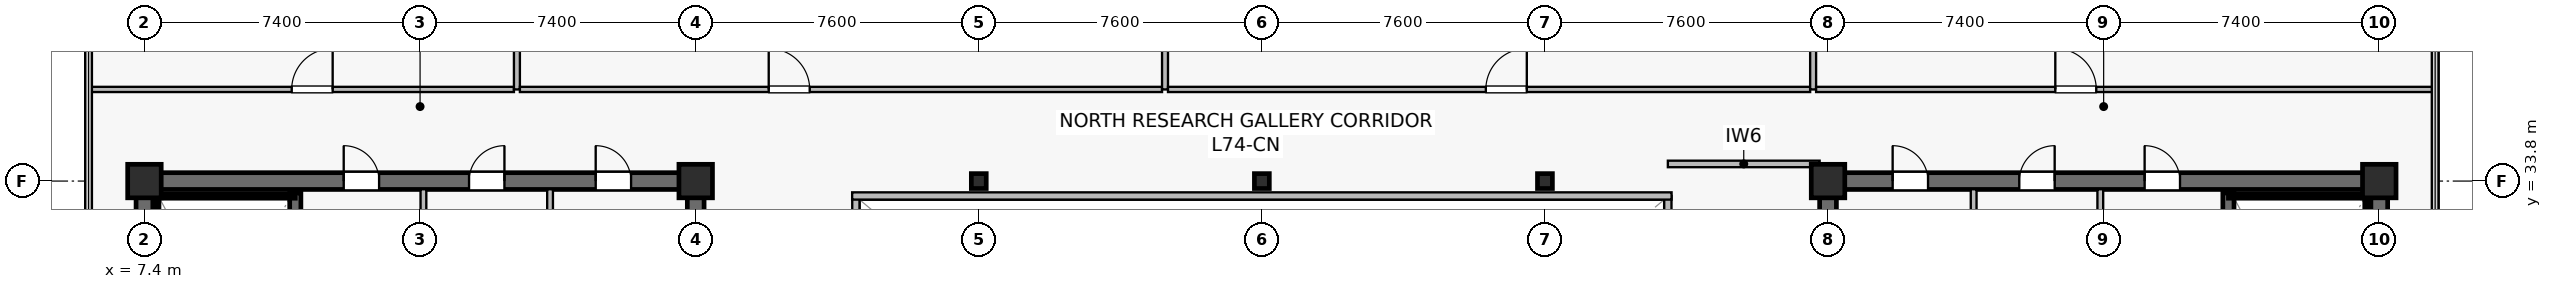
"""IFC4 building model, lengths in metres.
Left out: names, types, materials, properties, quantities, classifications, styles, units other than length and angle.
Written with IfcOpenShell. Run it as: python <this file> out.ifc"""

import sys

from ifc_helpers import new_model, si_unit, direction, frame, frame_2d, origin, origin_2d, place, context, subcontext, project, spatial, rectangle, i_section, extrude, source, transform, mapped, element, fill, save


model = new_model("IFC4")
c1 = context("Model", 3, precision=1e-05, world=origin(), true_north=direction((0.0, 1.0)))
c2 = subcontext(c1, "Body", "Model", "MODEL_VIEW")
j1 = project(units=[si_unit("LENGTHUNIT", "METRE"), si_unit("PLANEANGLEUNIT", "RADIAN")], contexts=[c1])
p1 = place(None, origin())
s1 = spatial("IfcSite", under=j1, at=p1, CompositionType="ELEMENT")
p2 = place(p1, origin())
s2 = spatial("IfcBuilding", under=s1, at=p2, CompositionType="ELEMENT")
p3 = place(p2, frame((0.0, 0.0, 310.2)))
s3 = spatial("IfcBuildingStorey", under=s2, at=p3, CompositionType="ELEMENT", Elevation=310.2)
p4 = place(p3, frame((7.175, 33.8, 0.0), z_axis=(0.0, 0.0, 1.0), x_axis=(1.0, 0.0, 0.0)))
e1 = element("IfcWall", 1, at=p4, inside=s3, PredefinedType="SHEAR", context=c2, shape_type="SweptSolid", body=[
    extrude(rectangle(XDim=15.25, YDim=0.45, at=frame_2d((7.625, 0.0))), origin(), (0.0, 0.0, 1.0), 3.9),
])
p5 = place(p4, frame((5.575, 0.0, 0.0)))
e2 = element("IfcOpeningElement", 2, at=p5, cuts=e1, PredefinedType="OPENING", context=c2, shape_type="SweptSolid", body=[
    extrude(rectangle(XDim=0.95, YDim=2.15, at=frame_2d((0.475, 1.075))), frame((0.0, 0.235, 0.0), z_axis=(0.0, -1.0, 0.0), x_axis=(1.0, 0.0, 0.0)), (0.0, 0.0, 1.0), 0.47),
])
p6 = place(p4, frame((8.94, 0.0, 0.0)))
e3 = element("IfcOpeningElement", 3, at=p6, cuts=e1, PredefinedType="OPENING", context=c2, shape_type="SweptSolid", body=[
    extrude(rectangle(XDim=0.95, YDim=2.15, at=frame_2d((0.475, 1.075))), frame((0.0, 0.235, 0.0), z_axis=(0.0, -1.0, 0.0), x_axis=(1.0, 0.0, 0.0)), (0.0, 0.0, 1.0), 0.47),
])
p7 = place(p4, frame((12.34, 0.0, 0.0)))
e4 = element("IfcOpeningElement", 4, at=p7, cuts=e1, PredefinedType="OPENING", context=c2, shape_type="SweptSolid", body=[
    extrude(rectangle(XDim=0.95, YDim=2.15, at=frame_2d((0.475, 1.075))), frame((0.0, 0.235, 0.0), z_axis=(0.0, -1.0, 0.0), x_axis=(1.0, 0.0, 0.0)), (0.0, 0.0, 1.0), 0.47),
])
p8 = place(p3, frame((7.4, 15.025, 0.0), z_axis=(0.0, 0.0, 1.0), x_axis=(0.0, 1.0, 0.0)))
e5 = element("IfcWall", 5, at=p8, inside=s3, PredefinedType="SHEAR", context=c2, shape_type="SweptSolid", body=[
    extrude(rectangle(XDim=18.55, YDim=0.45, at=frame_2d((9.275, 0.0))), origin(), (0.0, 0.0, 1.0), 3.9),
])
p9 = place(p3, frame((22.2, 15.025, 0.0), z_axis=(0.0, 0.0, 1.0), x_axis=(0.0, 1.0, 0.0)))
e6 = element("IfcWall", 6, at=p9, inside=s3, PredefinedType="SHEAR", context=c2, shape_type="SweptSolid", body=[
    extrude(rectangle(XDim=18.55, YDim=0.45, at=frame_2d((9.275, 0.0))), origin(), (0.0, 0.0, 1.0), 3.9),
])
p10 = place(p9, frame((3.525, 0.0, 0.0)))
e7 = element("IfcOpeningElement", 7, at=p10, cuts=e6, PredefinedType="OPENING", context=c2, shape_type="SweptSolid", body=[
    extrude(rectangle(XDim=1.42, YDim=2.2, at=frame_2d((0.71, 1.1))), frame((0.0, 0.235, 0.0), z_axis=(0.0, -1.0, 0.0), x_axis=(1.0, 0.0, 0.0)), (0.0, 0.0, 1.0), 0.47),
])
p11 = place(p3, frame((11.45, 24.85, 0.0), z_axis=(0.0, 0.0, 1.0), x_axis=(0.0, 1.0, 0.0)))
e8 = element("IfcWall", 8, at=p11, inside=s3, PredefinedType="SHEAR", context=c2, shape_type="SweptSolid", body=[
    extrude(rectangle(XDim=8.63, YDim=0.3, at=frame_2d((4.315, 0.0))), origin(), (0.0, 0.0, 1.0), 3.9),
])
p12 = place(p11, frame((0.42, 0.0, 0.0)))
e9 = element("IfcOpeningElement", 9, at=p12, cuts=e8, PredefinedType="OPENING", context=c2, shape_type="SweptSolid", body=[
    extrude(rectangle(XDim=1.1, YDim=2.15, at=frame_2d((0.55, 1.075))), frame((0.0, 0.16, 0.0), z_axis=(0.0, -1.0, 0.0), x_axis=(1.0, 0.0, 0.0)), (0.0, 0.0, 1.0), 0.32),
])
p13 = place(p3, frame((7.73, 33.4, 0.0), z_axis=(0.0, 0.0, 1.0), x_axis=(1.0, 0.0, 0.0)))
e10 = element("IfcWall", 10, at=p13, inside=s3, PredefinedType="SOLIDWALL", context=c2, shape_type="SweptSolid", body=[
    extrude(rectangle(XDim=3.72, YDim=0.12, at=frame_2d((1.86, 0.0))), origin(), (0.0, 0.0, 1.0), 3.9),
])
p14 = place(p3, frame((7.73, 25.0, 0.0), z_axis=(0.0, 0.0, 1.0), x_axis=(0.0, 1.0, 0.0)))
e11 = element("IfcWall", 11, at=p14, inside=s3, PredefinedType="SOLIDWALL", context=c2, shape_type="SweptSolid", body=[
    extrude(rectangle(XDim=8.32, YDim=0.12, at=frame_2d((4.16, 0.0))), origin(), (0.0, 0.0, 1.0), 3.9),
])
p15 = place(p3, frame((52.375, 33.8, 0.0), z_axis=(0.0, 0.0, 1.0), x_axis=(1.0, 0.0, 0.0)))
e12 = element("IfcWall", 12, at=p15, inside=s3, PredefinedType="SHEAR", context=c2, shape_type="SweptSolid", body=[
    extrude(rectangle(XDim=15.25, YDim=0.45, at=frame_2d((7.625, 0.0))), origin(), (0.0, 0.0, 1.0), 3.9),
])
p16 = place(p15, frame((8.725, 0.0, 0.0)))
e13 = element("IfcOpeningElement", 13, at=p16, cuts=e12, PredefinedType="OPENING", context=c2, shape_type="SweptSolid", body=[
    extrude(rectangle(XDim=0.95, YDim=2.15, at=frame_2d((0.475, 1.075))), frame((0.0, 0.235, 0.0), z_axis=(0.0, -1.0, 0.0), x_axis=(1.0, 0.0, 0.0)), (0.0, 0.0, 1.0), 0.47),
])
p17 = place(p15, frame((5.36, 0.0, 0.0)))
e14 = element("IfcOpeningElement", 14, at=p17, cuts=e12, PredefinedType="OPENING", context=c2, shape_type="SweptSolid", body=[
    extrude(rectangle(XDim=0.95, YDim=2.15, at=frame_2d((0.475, 1.075))), frame((0.0, 0.235, 0.0), z_axis=(0.0, -1.0, 0.0), x_axis=(1.0, 0.0, 0.0)), (0.0, 0.0, 1.0), 0.47),
])
p18 = place(p15, frame((1.96, 0.0, 0.0)))
e15 = element("IfcOpeningElement", 15, at=p18, cuts=e12, PredefinedType="OPENING", context=c2, shape_type="SweptSolid", body=[
    extrude(rectangle(XDim=0.95, YDim=2.15, at=frame_2d((0.475, 1.075))), frame((0.0, 0.235, 0.0), z_axis=(0.0, -1.0, 0.0), x_axis=(1.0, 0.0, 0.0)), (0.0, 0.0, 1.0), 0.47),
])
p19 = place(p3, frame((52.6, 15.025, 0.0), z_axis=(0.0, 0.0, 1.0), x_axis=(0.0, 1.0, 0.0)))
e16 = element("IfcWall", 16, at=p19, inside=s3, PredefinedType="SHEAR", context=c2, shape_type="SweptSolid", body=[
    extrude(rectangle(XDim=18.55, YDim=0.45, at=frame_2d((9.275, 0.0))), origin(), (0.0, 0.0, 1.0), 3.9),
])
p20 = place(p19, frame((3.525, 0.0, 0.0)))
e17 = element("IfcOpeningElement", 17, at=p20, cuts=e16, PredefinedType="OPENING", context=c2, shape_type="SweptSolid", body=[
    extrude(rectangle(XDim=1.42, YDim=2.2, at=frame_2d((0.71, 1.1))), frame((0.0, 0.235, 0.0), z_axis=(0.0, -1.0, 0.0), x_axis=(1.0, 0.0, 0.0)), (0.0, 0.0, 1.0), 0.47),
])
p21 = place(p3, frame((67.4, 15.025, 0.0), z_axis=(0.0, 0.0, 1.0), x_axis=(0.0, 1.0, 0.0)))
e18 = element("IfcWall", 18, at=p21, inside=s3, PredefinedType="SHEAR", context=c2, shape_type="SweptSolid", body=[
    extrude(rectangle(XDim=18.55, YDim=0.45, at=frame_2d((9.275, 0.0))), origin(), (0.0, 0.0, 1.0), 3.9),
])
p22 = place(p3, frame((63.35, 24.85, 0.0), z_axis=(0.0, 0.0, 1.0), x_axis=(0.0, 1.0, 0.0)))
e19 = element("IfcWall", 19, at=p22, inside=s3, PredefinedType="SHEAR", context=c2, shape_type="SweptSolid", body=[
    extrude(rectangle(XDim=8.63, YDim=0.3, at=frame_2d((4.315, 0.0))), origin(), (0.0, 0.0, 1.0), 3.9),
])
p23 = place(p22, frame((0.42, 0.0, 0.0)))
e20 = element("IfcOpeningElement", 20, at=p23, cuts=e19, PredefinedType="OPENING", context=c2, shape_type="SweptSolid", body=[
    extrude(rectangle(XDim=1.1, YDim=2.15, at=frame_2d((0.55, 1.075))), frame((0.0, 0.16, 0.0), z_axis=(0.0, -1.0, 0.0), x_axis=(1.0, 0.0, 0.0)), (0.0, 0.0, 1.0), 0.32),
])
p24 = place(p3, frame((63.35, 33.4, 0.0), z_axis=(0.0, 0.0, 1.0), x_axis=(1.0, 0.0, 0.0)))
e21 = element("IfcWall", 21, at=p24, inside=s3, PredefinedType="SOLIDWALL", context=c2, shape_type="SweptSolid", body=[
    extrude(rectangle(XDim=3.72, YDim=0.12, at=frame_2d((1.86, 0.0))), origin(), (0.0, 0.0, 1.0), 3.9),
])
p25 = place(p3, frame((67.07, 25.0, 0.0), z_axis=(0.0, 0.0, 1.0), x_axis=(0.0, 1.0, 0.0)))
e22 = element("IfcWall", 22, at=p25, inside=s3, PredefinedType="SOLIDWALL", context=c2, shape_type="SweptSolid", body=[
    extrude(rectangle(XDim=8.32, YDim=0.12, at=frame_2d((4.16, 0.0))), origin(), (0.0, 0.0, 1.0), 3.9),
])
m1 = source(origin(), c2, "Body", "SweptSolid", [
    extrude(rectangle(XDim=0.9, YDim=0.9, at=origin_2d()), origin(), (0.0, 0.0, 1.0), 4.2),
])
for number, where, z_axis, x_axis in (
    (23, (7.4, 33.8, 0.0), (0.0, 0.0, 1.0), (1.0, 0.0, 0.0)),
    (24, (22.2, 33.8, 0.0), (0.0, 0.0, 1.0), (1.0, 0.0, 0.0)),
    (25, (52.6, 33.8, 0.0), (0.0, 0.0, 1.0), (1.0, 0.0, 0.0)),
    (26, (67.4, 33.8, 0.0), (0.0, 0.0, 1.0), (1.0, 0.0, 0.0)),
):
    element("IfcColumn", number, at=place(p3, frame(where, z_axis=z_axis, x_axis=x_axis)), inside=s3, PredefinedType="COLUMN", context=c2, shape_type="MappedRepresentation", body=[
        mapped(m1, transform((0.0, 0.0, 0.0), scale=1.0)),
    ])
m2 = source(origin(), c2, "Body", "SweptSolid", [
    extrude(i_section(OverallWidth=0.4, OverallDepth=0.4, WebThickness=0.021, FlangeThickness=0.021, at=origin_2d()), origin(), (0.0, 0.0, 1.0), 4.2),
])
for number, where, z_axis, x_axis in (
    (27, (29.8, 33.8, 0.0), (0.0, 0.0, 1.0), (1.0, 0.0, 0.0)),
    (28, (37.4, 33.8, 0.0), (0.0, 0.0, 1.0), (1.0, 0.0, 0.0)),
    (29, (45.0, 33.8, 0.0), (0.0, 0.0, 1.0), (1.0, 0.0, 0.0)),
):
    element("IfcColumn", number, at=place(p3, frame(where, z_axis=z_axis, x_axis=x_axis)), inside=s3, PredefinedType="COLUMN", context=c2, shape_type="MappedRepresentation", body=[
        mapped(m2, transform((0.0, 0.0, 0.0), scale=1.0)),
    ])
p26 = place(p3, frame((14.89, 29.65, 0.0), z_axis=(0.0, 0.0, 1.0), x_axis=(0.0, 1.0, 0.0)))
e30 = element("IfcWall", 30, at=p26, inside=s3, PredefinedType="PLUMBINGWALL", context=c2, shape_type="SweptSolid", body=[
    extrude(rectangle(XDim=3.93, YDim=0.155, at=frame_2d((1.965, 0.0))), origin(), (0.0, 0.0, 1.0), 3.297),
])
p27 = place(p3, frame((18.29, 29.65, 0.0), z_axis=(0.0, 0.0, 1.0), x_axis=(0.0, 1.0, 0.0)))
e31 = element("IfcWall", 31, at=p27, inside=s3, PredefinedType="PLUMBINGWALL", context=c2, shape_type="SweptSolid", body=[
    extrude(rectangle(XDim=3.93, YDim=0.155, at=frame_2d((1.965, 0.0))), origin(), (0.0, 0.0, 1.0), 3.9),
])
p28 = place(p3, frame((59.91, 29.65, 0.0), z_axis=(0.0, 0.0, 1.0), x_axis=(0.0, 1.0, 0.0)))
e32 = element("IfcWall", 32, at=p28, inside=s3, PredefinedType="PLUMBINGWALL", context=c2, shape_type="SweptSolid", body=[
    extrude(rectangle(XDim=3.93, YDim=0.155, at=frame_2d((1.965, 0.0))), origin(), (0.0, 0.0, 1.0), 3.297),
])
p29 = place(p3, frame((56.51, 29.65, 0.0), z_axis=(0.0, 0.0, 1.0), x_axis=(0.0, 1.0, 0.0)))
e33 = element("IfcWall", 33, at=p29, inside=s3, PredefinedType="PLUMBINGWALL", context=c2, shape_type="SweptSolid", body=[
    extrude(rectangle(XDim=3.93, YDim=0.155, at=frame_2d((1.965, 0.0))), origin(), (0.0, 0.0, 1.0), 3.9),
])
p30 = place(p3, frame((48.3, 34.26, 0.0), z_axis=(0.0, 0.0, 1.0), x_axis=(1.0, 0.0, 0.0)))
e34 = element("IfcWall", 34, at=p30, inside=s3, PredefinedType="PARTITIONING", context=c2, shape_type="SweptSolid", body=[
    extrude(rectangle(XDim=4.075, YDim=0.175, at=frame_2d((2.038, 0.0))), origin(), (0.0, 0.0, 1.0), 3.635),
])
p31 = place(p3, frame((26.5, 15.2, 0.0), z_axis=(0.0, 0.0, 1.0), x_axis=(0.0, 1.0, 0.0)))
e35 = element("IfcWall", 35, at=p31, inside=s3, PredefinedType="SOLIDWALL", context=c2, shape_type="SweptSolid", body=[
    extrude(rectangle(XDim=18.2, YDim=0.195, at=frame_2d((9.1, 0.0))), origin(), (0.0, 0.0, 1.0), 3.9),
])
p32 = place(p31, frame((1.8, 0.0, 0.9)))
e36 = element("IfcOpeningElement", 36, at=p32, cuts=e35, PredefinedType="OPENING", context=c2, shape_type="SweptSolid", body=[
    extrude(rectangle(XDim=1.5, YDim=1.4, at=frame_2d((0.75, 0.7))), frame((0.0, 0.107, 0.0), z_axis=(0.0, -1.0, 0.0), x_axis=(1.0, 0.0, 0.0)), (0.0, 0.0, 1.0), 0.215),
])
p33 = place(p31, frame((13.2, 0.0, 0.9)))
e37 = element("IfcOpeningElement", 37, at=p33, cuts=e35, PredefinedType="OPENING", context=c2, shape_type="SweptSolid", body=[
    extrude(rectangle(XDim=1.5, YDim=1.4, at=frame_2d((0.75, 0.7))), frame((0.0, 0.107, 0.0), z_axis=(0.0, -1.0, 0.0), x_axis=(1.0, 0.0, 0.0)), (0.0, 0.0, 1.0), 0.215),
])
p34 = place(p3, frame((48.3, 15.2, 0.0), z_axis=(0.0, 0.0, 1.0), x_axis=(0.0, 1.0, 0.0)))
e38 = element("IfcWall", 38, at=p34, inside=s3, PredefinedType="SOLIDWALL", context=c2, shape_type="SweptSolid", body=[
    extrude(rectangle(XDim=18.2, YDim=0.195, at=frame_2d((9.1, 0.0))), origin(), (0.0, 0.0, 1.0), 3.9),
])
p35 = place(p34, frame((1.8, 0.0, 0.9)))
e39 = element("IfcOpeningElement", 39, at=p35, cuts=e38, PredefinedType="OPENING", context=c2, shape_type="SweptSolid", body=[
    extrude(rectangle(XDim=1.5, YDim=1.4, at=frame_2d((0.75, 0.7))), frame((0.0, 0.107, 0.0), z_axis=(0.0, -1.0, 0.0), x_axis=(1.0, 0.0, 0.0)), (0.0, 0.0, 1.0), 0.215),
])
p36 = place(p34, frame((13.2, 0.0, 0.9)))
e40 = element("IfcOpeningElement", 40, at=p36, cuts=e38, PredefinedType="OPENING", context=c2, shape_type="SweptSolid", body=[
    extrude(rectangle(XDim=1.5, YDim=1.4, at=frame_2d((0.75, 0.7))), frame((0.0, 0.107, 0.0), z_axis=(0.0, -1.0, 0.0), x_axis=(1.0, 0.0, 0.0)), (0.0, 0.0, 1.0), 0.215),
])
p37 = place(p3, frame((26.4, 33.4, 0.0), z_axis=(0.0, 0.0, 1.0), x_axis=(1.0, 0.0, 0.0)))
e41 = element("IfcWall", 41, at=p37, inside=s3, PredefinedType="SOLIDWALL", context=c2, shape_type="SweptSolid", body=[
    extrude(rectangle(XDim=22.0, YDim=0.195, at=frame_2d((11.0, 0.0))), origin(), (0.0, 0.0, 1.0), 3.9),
])
p38 = place(p3, frame((5.91, 36.26, 0.0), z_axis=(0.0, 0.0, 1.0), x_axis=(1.0, 0.0, 0.0)))
e42 = element("IfcWall", 42, at=p38, inside=s3, PredefinedType="PARTITIONING", context=c2, shape_type="SweptSolid", body=[
    extrude(rectangle(XDim=11.41, YDim=0.14, at=frame_2d((5.705, 0.0))), origin(), (0.0, 0.0, 1.0), 3.297),
])
p39 = place(p38, frame((5.443, 0.0, 0.0)))
e43 = element("IfcOpeningElement", 43, at=p39, cuts=e42, PredefinedType="OPENING", context=c2, shape_type="SweptSolid", body=[
    extrude(rectangle(XDim=1.1, YDim=2.18, at=frame_2d((0.55, 1.09))), frame((0.0, 0.08, 0.0), z_axis=(0.0, -1.0, 0.0), x_axis=(1.0, 0.0, 0.0)), (0.0, 0.0, 1.0), 0.16),
])
p40 = place(p3, frame((17.4, 36.26, 0.0), z_axis=(0.0, 0.0, 1.0), x_axis=(0.0, 1.0, 0.0)))
e44 = element("IfcWall", 44, at=p40, inside=s3, PredefinedType="PARTITIONING", context=c2, shape_type="SweptSolid", body=[
    extrude(rectangle(XDim=8.53, YDim=0.16, at=frame_2d((4.265, 0.0))), origin(), (0.0, 0.0, 1.0), 3.235),
])
p41 = place(p3, frame((17.48, 36.26, 0.0), z_axis=(0.0, 0.0, 1.0), x_axis=(1.0, 0.0, 0.0)))
e45 = element("IfcWall", 45, at=p41, inside=s3, PredefinedType="PARTITIONING", context=c2, shape_type="SweptSolid", body=[
    extrude(rectangle(XDim=17.24, YDim=0.14, at=frame_2d((8.62, 0.0))), origin(), (0.0, 0.0, 1.0), 3.297),
])
p42 = place(p41, frame((6.68, 0.0, 0.0)))
e46 = element("IfcOpeningElement", 46, at=p42, cuts=e45, PredefinedType="OPENING", context=c2, shape_type="SweptSolid", body=[
    extrude(rectangle(XDim=1.1, YDim=2.18, at=frame_2d((0.55, 1.09))), frame((0.0, 0.08, 0.0), z_axis=(0.0, -1.0, 0.0), x_axis=(1.0, 0.0, 0.0)), (0.0, 0.0, 1.0), 0.16),
])
p43 = place(p3, frame((34.8, 36.26, 0.0), z_axis=(0.0, 0.0, 1.0), x_axis=(0.0, 1.0, 0.0)))
e47 = element("IfcWall", 47, at=p43, inside=s3, PredefinedType="PARTITIONING", context=c2, shape_type="SweptSolid", body=[
    extrude(rectangle(XDim=7.53, YDim=0.16, at=frame_2d((3.765, 0.0))), origin(), (0.0, 0.0, 1.0), 2.985),
])
p44 = place(p3, frame((34.88, 36.26, 0.0), z_axis=(0.0, 0.0, 1.0), x_axis=(1.0, 0.0, 0.0)))
e48 = element("IfcWall", 48, at=p44, inside=s3, PredefinedType="PARTITIONING", context=c2, shape_type="SweptSolid", body=[
    extrude(rectangle(XDim=17.24, YDim=0.14, at=frame_2d((8.62, 0.0))), origin(), (0.0, 0.0, 1.0), 3.297),
])
p45 = place(p44, frame((8.533, 0.0, 0.0)))
e49 = element("IfcOpeningElement", 49, at=p45, cuts=e48, PredefinedType="OPENING", context=c2, shape_type="SweptSolid", body=[
    extrude(rectangle(XDim=1.1, YDim=2.18, at=frame_2d((0.55, 1.09))), frame((0.0, 0.08, 0.0), z_axis=(0.0, -1.0, 0.0), x_axis=(1.0, 0.0, 0.0)), (0.0, 0.0, 1.0), 0.16),
])
p46 = place(p3, frame((52.2, 36.26, 0.0), z_axis=(0.0, 0.0, 1.0), x_axis=(0.0, 1.0, 0.0)))
e50 = element("IfcWall", 50, at=p46, inside=s3, PredefinedType="PARTITIONING", context=c2, shape_type="SweptSolid", body=[
    extrude(rectangle(XDim=8.53, YDim=0.16, at=frame_2d((4.265, 0.0))), origin(), (0.0, 0.0, 1.0), 2.985),
])
p47 = place(p3, frame((52.28, 36.26, 0.0), z_axis=(0.0, 0.0, 1.0), x_axis=(1.0, 0.0, 0.0)))
e51 = element("IfcWall", 51, at=p47, inside=s3, PredefinedType="PARTITIONING", context=c2, shape_type="SweptSolid", body=[
    extrude(rectangle(XDim=16.61, YDim=0.14, at=frame_2d((8.305, 0.0))), origin(), (0.0, 0.0, 1.0), 3.297),
])
p48 = place(p47, frame((6.422, 0.0, 0.0)))
e52 = element("IfcOpeningElement", 52, at=p48, cuts=e51, PredefinedType="OPENING", context=c2, shape_type="SweptSolid", body=[
    extrude(rectangle(XDim=1.1, YDim=2.18, at=frame_2d((0.55, 1.09))), frame((0.0, 0.08, 0.0), z_axis=(0.0, -1.0, 0.0), x_axis=(1.0, 0.0, 0.0)), (0.0, 0.0, 1.0), 0.16),
])
m3 = source(origin(), c2, "Body", "SweptSolid", [
    extrude(rectangle(XDim=0.95, YDim=2.15, at=frame_2d((0.475, 1.075))), frame((0.0, 0.025, 0.0), z_axis=(0.0, -1.0, 0.0), x_axis=(1.0, 0.0, 0.0)), (0.0, 0.0, 1.0), 0.05),
])
p49 = place(p5, origin())
e53 = element("IfcDoor", 53, at=p49, inside=s3, OperationType="SINGLE_SWING_LEFT", PredefinedType="DOOR", context=c2, shape_type="MappedRepresentation", body=[
    mapped(m3, transform((0.0, 0.0, 0.0), scale=1.0)),
])
fill(e2, e53)
p50 = place(p6, origin())
e54 = element("IfcDoor", 54, at=p50, inside=s3, OperationType="SINGLE_SWING_RIGHT", PredefinedType="DOOR", context=c2, shape_type="MappedRepresentation", body=[
    mapped(m3, transform((0.0, 0.0, 0.0), scale=1.0)),
])
fill(e3, e54)
p51 = place(p7, origin())
e55 = element("IfcDoor", 55, at=p51, inside=s3, OperationType="SINGLE_SWING_LEFT", PredefinedType="DOOR", context=c2, shape_type="MappedRepresentation", body=[
    mapped(m3, transform((0.0, 0.0, 0.0), scale=1.0)),
])
fill(e4, e55)
p52 = place(p16, origin())
e56 = element("IfcDoor", 56, at=p52, inside=s3, OperationType="SINGLE_SWING_LEFT", PredefinedType="DOOR", context=c2, shape_type="MappedRepresentation", body=[
    mapped(m3, transform((0.0, 0.0, 0.0), scale=1.0)),
])
fill(e13, e56)
p53 = place(p17, origin())
e57 = element("IfcDoor", 57, at=p53, inside=s3, OperationType="SINGLE_SWING_RIGHT", PredefinedType="DOOR", context=c2, shape_type="MappedRepresentation", body=[
    mapped(m3, transform((0.0, 0.0, 0.0), scale=1.0)),
])
fill(e14, e57)
p54 = place(p18, origin())
e58 = element("IfcDoor", 58, at=p54, inside=s3, OperationType="SINGLE_SWING_LEFT", PredefinedType="DOOR", context=c2, shape_type="MappedRepresentation", body=[
    mapped(m3, transform((0.0, 0.0, 0.0), scale=1.0)),
])
fill(e15, e58)
m4 = source(origin(), c2, "Body", "SweptSolid", [
    extrude(rectangle(XDim=1.1, YDim=2.18, at=frame_2d((0.55, 1.09))), frame((0.0, 0.025, 0.0), z_axis=(0.0, -1.0, 0.0), x_axis=(1.0, 0.0, 0.0)), (0.0, 0.0, 1.0), 0.05),
])
p55 = place(p39, origin())
e59 = element("IfcDoor", 59, at=p55, inside=s3, OperationType="SINGLE_SWING_RIGHT", PredefinedType="DOOR", context=c2, shape_type="MappedRepresentation", body=[
    mapped(m4, transform((0.0, 0.0, 0.0), scale=1.0)),
])
fill(e43, e59)
p56 = place(p42, origin())
e60 = element("IfcDoor", 60, at=p56, inside=s3, OperationType="SINGLE_SWING_LEFT", PredefinedType="DOOR", context=c2, shape_type="MappedRepresentation", body=[
    mapped(m4, transform((0.0, 0.0, 0.0), scale=1.0)),
])
fill(e46, e60)
p57 = place(p45, origin())
e61 = element("IfcDoor", 61, at=p57, inside=s3, OperationType="SINGLE_SWING_RIGHT", PredefinedType="DOOR", context=c2, shape_type="MappedRepresentation", body=[
    mapped(m4, transform((0.0, 0.0, 0.0), scale=1.0)),
])
fill(e49, e61)
p58 = place(p48, origin())
e62 = element("IfcDoor", 62, at=p58, inside=s3, OperationType="SINGLE_SWING_LEFT", PredefinedType="DOOR", context=c2, shape_type="MappedRepresentation", body=[
    mapped(m4, transform((0.0, 0.0, 0.0), scale=1.0)),
])
fill(e52, e62)
save(model, sys.argv[1])
